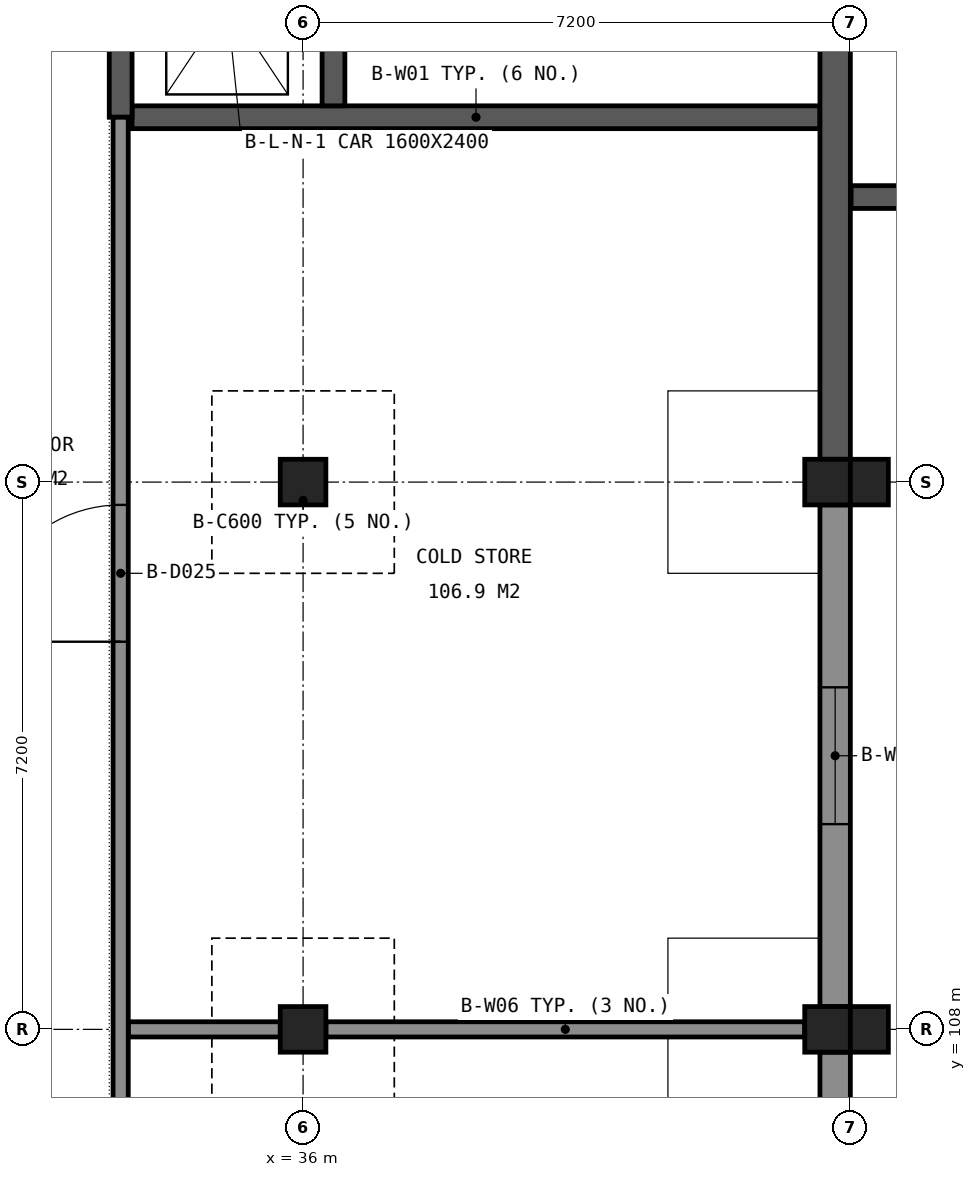
"""IFC4 building model, lengths in metres.
Left out: names, types, materials, properties, quantities, classifications, styles, units other than length and angle.
Written with IfcOpenShell. Run it as: python <this file> out.ifc"""

import sys

from ifc_helpers import new_model, si_unit, direction, frame, frame_2d, origin, origin_2d, place, context, subcontext, project, spatial, rectangle, extrude, element, fill, save


model = new_model("IFC4")
c1 = context("Model", 3, precision=1e-05, world=origin(), true_north=direction((0.0, 1.0)))
c2 = subcontext(c1, "Body", "Model", "MODEL_VIEW")
j1 = project(units=[si_unit("LENGTHUNIT", "METRE"), si_unit("PLANEANGLEUNIT", "RADIAN")], contexts=[c1])
p1 = place(None, origin())
s1 = spatial("IfcSite", under=j1, at=p1, CompositionType="ELEMENT")
p2 = place(p1, origin())
s2 = spatial("IfcBuilding", under=s1, at=p2, CompositionType="ELEMENT")
p3 = place(p2, origin())
s3 = spatial("IfcBuildingStorey", under=s2, at=p3, CompositionType="ELEMENT", Elevation=0.0)
for number, where, z_axis, x_axis in (
    (1, (36.0, 115.2, 0.0), (0.0, 0.0, 1.0), (1.0, 0.0, 0.0)),
    (2, (36.0, 108.0, 0.0), (0.0, 0.0, 1.0), (1.0, 0.0, 0.0)),
    (3, (42.9, 115.2, 0.0), (0.0, 0.0, 1.0), (1.0, 0.0, 0.0)),
    (4, (42.9, 108.0, 0.0), (0.0, 0.0, 1.0), (1.0, 0.0, 0.0)),
):
    element("IfcColumn", number, at=place(p3, frame(where, z_axis=z_axis, x_axis=x_axis)), inside=s3, PredefinedType="COLUMN", context=c2, shape_type="SweptSolid", body=[
        extrude(rectangle(XDim=0.6, YDim=0.6, at=origin_2d()), origin(), (0.0, 0.0, 1.0), 4.8),
    ])
p4 = place(p3, frame((33.75, 120.0, 0.0), z_axis=(0.0, 0.0, 1.0), x_axis=(1.0, 0.0, 0.0)))
e5 = element("IfcWall", 5, at=p4, inside=s3, PredefinedType="SHEAR", context=c2, shape_type="SweptSolid", body=[
    extrude(rectangle(XDim=9.05, YDim=0.3, at=frame_2d((4.525, 0.0))), origin(), (0.0, 0.0, 1.0), 4.55),
])
p5 = place(p3, frame((33.6, 120.0, 0.0), z_axis=(0.0, 0.0, 1.0), x_axis=(0.0, 1.0, 0.0)))
e6 = element("IfcWall", 6, at=p5, inside=s3, PredefinedType="SHEAR", context=c2, shape_type="SweptSolid", body=[
    extrude(rectangle(XDim=9.2, YDim=0.3, at=frame_2d((4.6, 0.0))), origin(), (0.0, 0.0, 1.0), 4.55),
])
p6 = place(p5, frame((4.0, 0.0, 0.0)))
e7 = element("IfcOpeningElement", 7, at=p6, cuts=e6, PredefinedType="OPENING", context=c2, shape_type="SweptSolid", body=[
    extrude(rectangle(XDim=1.2, YDim=2.1, at=frame_2d((0.6, 1.05))), frame((0.0, 0.16, 0.0), z_axis=(0.0, -1.0, 0.0), x_axis=(1.0, 0.0, 0.0)), (0.0, 0.0, 1.0), 0.32),
])
p7 = place(p5, frame((7.45, 0.0, 0.0)))
e8 = element("IfcOpeningElement", 8, at=p7, cuts=e6, PredefinedType="OPENING", context=c2, shape_type="SweptSolid", body=[
    extrude(rectangle(XDim=0.9, YDim=2.1, at=frame_2d((0.45, 1.05))), frame((0.0, 0.16, 0.0), z_axis=(0.0, -1.0, 0.0), x_axis=(1.0, 0.0, 0.0)), (0.0, 0.0, 1.0), 0.32),
])
p8 = place(p3, frame((36.4, 120.15, -1.2), z_axis=(0.0, 0.0, 1.0), x_axis=(0.0, 1.0, 0.0)))
e9 = element("IfcWall", 9, at=p8, inside=s3, PredefinedType="SHEAR", context=c2, shape_type="SweptSolid", body=[
    extrude(rectangle(XDim=2.7, YDim=0.3, at=frame_2d((1.35, 0.0))), origin(), (0.0, 0.0, 1.0), 5.75),
])
p9 = place(p3, frame((43.0, 115.5, 0.0), z_axis=(0.0, 0.0, 1.0), x_axis=(0.0, 1.0, 0.0)))
e10 = element("IfcWall", 10, at=p9, inside=s3, PredefinedType="SHEAR", context=c2, shape_type="SweptSolid", body=[
    extrude(rectangle(XDim=14.1, YDim=0.4, at=frame_2d((7.05, 0.0))), origin(), (0.0, 0.0, 1.0), 4.55),
])
p10 = place(p9, frame((13.0, 0.0, 0.0), z_axis=(0.0, 0.0, 1.0), x_axis=(-1.0, 0.0, 0.0)))
e11 = element("IfcOpeningElement", 11, at=p10, cuts=e10, PredefinedType="OPENING", context=c2, shape_type="SweptSolid", body=[
    extrude(rectangle(XDim=1.2, YDim=2.1, at=frame_2d((0.6, 1.05))), frame((0.0, 0.21, 0.0), z_axis=(0.0, -1.0, 0.0), x_axis=(1.0, 0.0, 0.0)), (0.0, 0.0, 1.0), 0.42),
])
p11 = place(p3, frame((43.21, 118.95, -0.25), z_axis=(0.0, 0.0, 1.0), x_axis=(1.0, 0.0, 0.0)))
e12 = element("IfcWall", 12, at=p11, inside=s3, PredefinedType="SOLIDWALL", context=c2, shape_type="SweptSolid", body=[
    extrude(rectangle(XDim=7.18, YDim=0.3, at=frame_2d((3.59, 0.0))), origin(), (0.0, 0.0, 1.0), 6.15),
])
p12 = place(p3, frame((43.0, 101.1, 0.0), z_axis=(0.0, 0.0, 1.0), x_axis=(0.0, 1.0, 0.0)))
e13 = element("IfcWall", 13, at=p12, inside=s3, PredefinedType="SOLIDWALL", context=c2, shape_type="SweptSolid", body=[
    extrude(rectangle(XDim=6.6, YDim=0.4, at=frame_2d((3.3, 0.0))), origin(), (0.0, 0.0, 1.0), 3.95),
])
p13 = place(p12, frame((2.4, 0.0, 2.0)))
e14 = element("IfcOpeningElement", 14, at=p13, cuts=e13, PredefinedType="OPENING", context=c2, shape_type="SweptSolid", body=[
    extrude(rectangle(XDim=1.8, YDim=1.5, at=frame_2d((0.9, 0.75))), frame((0.0, 0.21, 0.0), z_axis=(0.0, -1.0, 0.0), x_axis=(1.0, 0.0, 0.0)), (0.0, 0.0, 1.0), 0.42),
])
p14 = place(p3, frame((43.0, 108.3, 0.0), z_axis=(0.0, 0.0, 1.0), x_axis=(0.0, 1.0, 0.0)))
e15 = element("IfcWall", 15, at=p14, inside=s3, PredefinedType="SOLIDWALL", context=c2, shape_type="SweptSolid", body=[
    extrude(rectangle(XDim=6.6, YDim=0.4, at=frame_2d((3.3, 0.0))), origin(), (0.0, 0.0, 1.0), 3.95),
])
p15 = place(p14, frame((2.4, 0.0, 2.0)))
e16 = element("IfcOpeningElement", 16, at=p15, cuts=e15, PredefinedType="OPENING", context=c2, shape_type="SweptSolid", body=[
    extrude(rectangle(XDim=1.8, YDim=1.5, at=frame_2d((0.9, 0.75))), frame((0.0, 0.21, 0.0), z_axis=(0.0, -1.0, 0.0), x_axis=(1.0, 0.0, 0.0)), (0.0, 0.0, 1.0), 0.42),
])
for number, where, z_axis, x_axis in (
    (17, (43.45, 108.0, -0.25), (0.0, 0.0, 1.0), (1.0, 0.0, 0.0)),
    (18, (43.45, 115.2, -0.25), (0.0, 0.0, 1.0), (1.0, 0.0, 0.0)),
):
    element("IfcColumn", number, at=place(p3, frame(where, z_axis=z_axis, x_axis=x_axis)), inside=s3, PredefinedType="COLUMN", context=c2, shape_type="SweptSolid", body=[
        extrude(rectangle(XDim=0.5, YDim=0.6, at=origin_2d()), origin(), (0.0, 0.0, 1.0), 5.05),
    ])
p16 = place(p3, frame((33.7, 108.0, 0.0), z_axis=(0.0, 0.0, 1.0), x_axis=(1.0, 0.0, 0.0)))
e19 = element("IfcWall", 19, at=p16, inside=s3, PredefinedType="PARTITIONING", context=c2, shape_type="SweptSolid", body=[
    extrude(rectangle(XDim=2.0, YDim=0.2, at=frame_2d((1.0, 0.0))), origin(), (0.0, 0.0, 1.0), 3.95),
])
p17 = place(p3, frame((36.3, 108.0, 0.0), z_axis=(0.0, 0.0, 1.0), x_axis=(1.0, 0.0, 0.0)))
e20 = element("IfcWall", 20, at=p17, inside=s3, PredefinedType="PARTITIONING", context=c2, shape_type="SweptSolid", body=[
    extrude(rectangle(XDim=6.3, YDim=0.2, at=frame_2d((3.15, 0.0))), origin(), (0.0, 0.0, 1.0), 3.95),
])
p18 = place(p3, frame((33.6, 96.0, 0.0), z_axis=(0.0, 0.0, 1.0), x_axis=(0.0, 1.0, 0.0)))
e21 = element("IfcWall", 21, at=p18, inside=s3, PredefinedType="PARTITIONING", context=c2, shape_type="SweptSolid", body=[
    extrude(rectangle(XDim=24.0, YDim=0.2, at=frame_2d((12.0, 0.0))), origin(), (0.0, 0.0, 1.0), 3.95),
])
p19 = place(p18, frame((17.1, 0.0, 0.0)))
e22 = element("IfcOpeningElement", 22, at=p19, cuts=e21, PredefinedType="OPENING", context=c2, shape_type="SweptSolid", body=[
    extrude(rectangle(XDim=1.8, YDim=2.1, at=frame_2d((0.9, 1.05))), frame((0.0, 0.11, 0.0), z_axis=(0.0, -1.0, 0.0), x_axis=(1.0, 0.0, 0.0)), (0.0, 0.0, 1.0), 0.22),
])
p20 = place(p18, frame((5.1, 0.0, 0.0)))
e23 = element("IfcOpeningElement", 23, at=p20, cuts=e21, PredefinedType="OPENING", context=c2, shape_type="SweptSolid", body=[
    extrude(rectangle(XDim=1.8, YDim=2.1, at=frame_2d((0.9, 1.05))), frame((0.0, 0.11, 0.0), z_axis=(0.0, -1.0, 0.0), x_axis=(1.0, 0.0, 0.0)), (0.0, 0.0, 1.0), 0.22),
])
p21 = place(p15, origin())
e24 = element("IfcWindow", 24, at=p21, inside=s3, PartitioningType="SINGLE_PANEL", PredefinedType="WINDOW", context=c2, shape_type="SweptSolid", body=[
    extrude(rectangle(XDim=1.8, YDim=1.5, at=frame_2d((0.9, 0.75))), frame((0.0, 0.03, 0.0), z_axis=(0.0, -1.0, 0.0), x_axis=(1.0, 0.0, 0.0)), (0.0, 0.0, 1.0), 0.06),
])
fill(e16, e24)
p22 = place(p19, origin())
e25 = element("IfcDoor", 25, at=p22, inside=s3, OperationType="DOUBLE_DOOR_DOUBLE_SWING", PredefinedType="DOOR", context=c2, shape_type="SweptSolid", body=[
    extrude(rectangle(XDim=1.8, YDim=2.1, at=frame_2d((0.9, 1.05))), frame((0.0, 0.025, 0.0), z_axis=(0.0, -1.0, 0.0), x_axis=(1.0, 0.0, 0.0)), (0.0, 0.0, 1.0), 0.05),
])
fill(e22, e25)
save(model, sys.argv[1])
